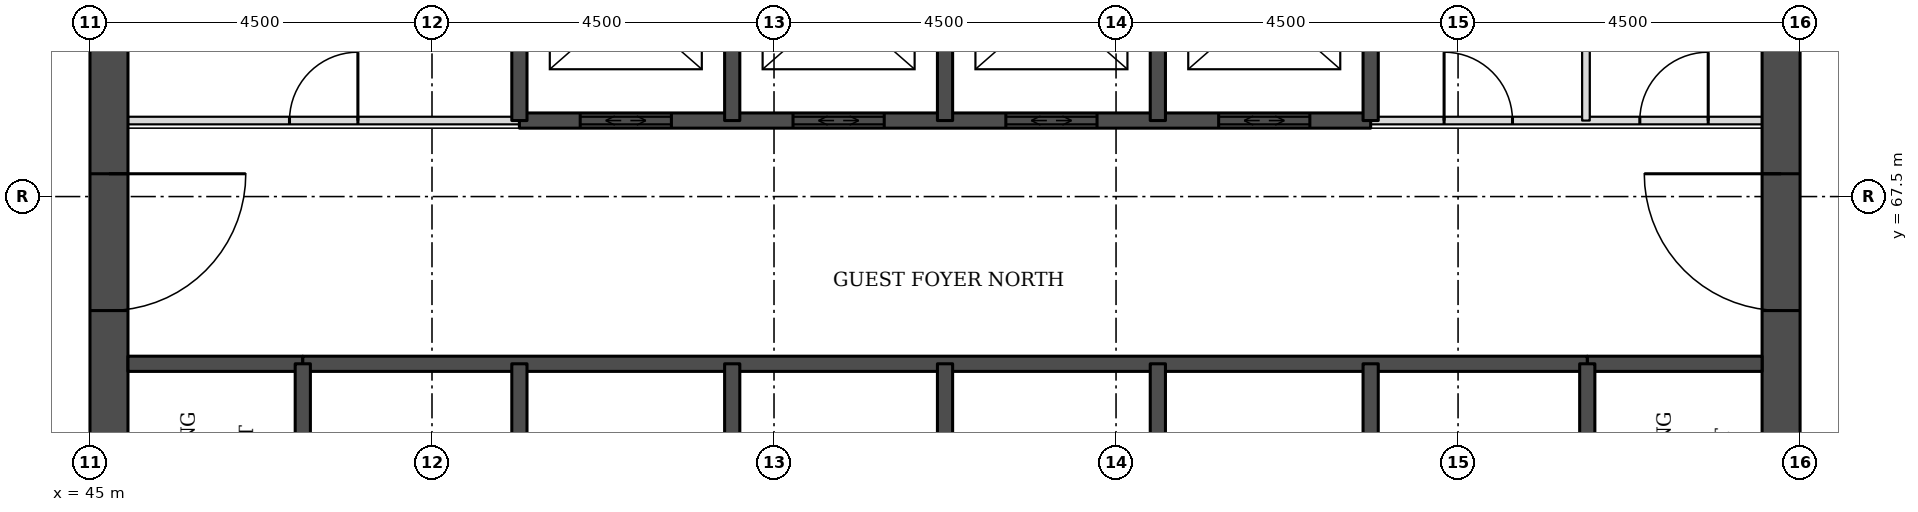
"""IFC4 building model, lengths in metres.
Left out: names, types, materials, properties, quantities, classifications, styles, units other than length and angle.
Written with IfcOpenShell. Run it as: python <this file> out.ifc"""

import sys

from ifc_helpers import new_model, si_unit, direction, frame, frame_2d, origin, place, context, subcontext, project, spatial, rectangle, extrude, element, fill, save


model = new_model("IFC4")
c1 = context("Model", 3, precision=1e-05, world=origin(), true_north=direction((0.0, 1.0)))
c2 = subcontext(c1, "Body", "Model", "MODEL_VIEW")
j1 = project(units=[si_unit("LENGTHUNIT", "METRE"), si_unit("PLANEANGLEUNIT", "RADIAN")], contexts=[c1])
p1 = place(None, origin())
s1 = spatial("IfcSite", under=j1, at=p1, CompositionType="ELEMENT")
p2 = place(p1, origin())
s2 = spatial("IfcBuilding", under=s1, at=p2, CompositionType="ELEMENT")
p3 = place(p2, frame((0.0, 0.0, 26.4)))
s3 = spatial("IfcBuildingStorey", under=s2, at=p3, CompositionType="ELEMENT", Elevation=26.4)
p4 = place(p3, frame((45.25, 49.5, 0.0), z_axis=(0.0, 0.0, 1.0), x_axis=(0.0, 1.0, 0.0)))
e1 = element("IfcWall", 1, at=p4, inside=s3, PredefinedType="SHEAR", context=c2, shape_type="SweptSolid", body=[
    extrude(rectangle(XDim=22.5, YDim=0.5, at=frame_2d((11.25, 0.0))), origin(), (0.0, 0.0, 1.0), 3.3),
])
p5 = place(p4, frame((4.2, 0.0, 0.0)))
e2 = element("IfcOpeningElement", 2, at=p5, cuts=e1, PredefinedType="OPENING", context=c2, shape_type="SweptSolid", body=[
    extrude(rectangle(XDim=1.8, YDim=2.1, at=frame_2d((0.9, 1.05))), frame((0.0, 0.26, 0.0), z_axis=(0.0, -1.0, 0.0), x_axis=(1.0, 0.0, 0.0)), (0.0, 0.0, 1.0), 0.52),
])
p6 = place(p4, frame((6.9, 0.0, 0.0)))
e3 = element("IfcOpeningElement", 3, at=p6, cuts=e1, PredefinedType="OPENING", context=c2, shape_type="SweptSolid", body=[
    extrude(rectangle(XDim=1.1, YDim=2.1, at=frame_2d((0.55, 1.05))), frame((0.0, 0.26, 0.0), z_axis=(0.0, -1.0, 0.0), x_axis=(1.0, 0.0, 0.0)), (0.0, 0.0, 1.0), 0.52),
])
p7 = place(p4, frame((13.6, 0.0, 0.0)))
e4 = element("IfcOpeningElement", 4, at=p7, cuts=e1, PredefinedType="OPENING", context=c2, shape_type="SweptSolid", body=[
    extrude(rectangle(XDim=1.1, YDim=2.1, at=frame_2d((0.55, 1.05))), frame((0.0, 0.26, 0.0), z_axis=(0.0, -1.0, 0.0), x_axis=(1.0, 0.0, 0.0)), (0.0, 0.0, 1.0), 0.52),
])
p8 = place(p4, frame((16.5, 0.0, 0.0)))
e5 = element("IfcOpeningElement", 5, at=p8, cuts=e1, PredefinedType="OPENING", context=c2, shape_type="SweptSolid", body=[
    extrude(rectangle(XDim=1.8, YDim=2.1, at=frame_2d((0.9, 1.05))), frame((0.0, 0.26, 0.0), z_axis=(0.0, -1.0, 0.0), x_axis=(1.0, 0.0, 0.0)), (0.0, 0.0, 1.0), 0.52),
])
p9 = place(p3, frame((67.25, 49.5, 0.0), z_axis=(0.0, 0.0, 1.0), x_axis=(0.0, 1.0, 0.0)))
e6 = element("IfcWall", 6, at=p9, inside=s3, PredefinedType="SHEAR", context=c2, shape_type="SweptSolid", body=[
    extrude(rectangle(XDim=22.5, YDim=0.5, at=frame_2d((11.25, 0.0))), origin(), (0.0, 0.0, 1.0), 3.3),
])
p10 = place(p9, frame((4.2, 0.0, 0.0)))
e7 = element("IfcOpeningElement", 7, at=p10, cuts=e6, PredefinedType="OPENING", context=c2, shape_type="SweptSolid", body=[
    extrude(rectangle(XDim=1.8, YDim=2.1, at=frame_2d((0.9, 1.05))), frame((0.0, 0.26, 0.0), z_axis=(0.0, -1.0, 0.0), x_axis=(1.0, 0.0, 0.0)), (0.0, 0.0, 1.0), 0.52),
])
p11 = place(p9, frame((6.9, 0.0, 0.0)))
e8 = element("IfcOpeningElement", 8, at=p11, cuts=e6, PredefinedType="OPENING", context=c2, shape_type="SweptSolid", body=[
    extrude(rectangle(XDim=1.1, YDim=2.1, at=frame_2d((0.55, 1.05))), frame((0.0, 0.26, 0.0), z_axis=(0.0, -1.0, 0.0), x_axis=(1.0, 0.0, 0.0)), (0.0, 0.0, 1.0), 0.52),
])
p12 = place(p9, frame((13.6, 0.0, 0.0)))
e9 = element("IfcOpeningElement", 9, at=p12, cuts=e6, PredefinedType="OPENING", context=c2, shape_type="SweptSolid", body=[
    extrude(rectangle(XDim=1.1, YDim=2.1, at=frame_2d((0.55, 1.05))), frame((0.0, 0.26, 0.0), z_axis=(0.0, -1.0, 0.0), x_axis=(1.0, 0.0, 0.0)), (0.0, 0.0, 1.0), 0.52),
])
p13 = place(p9, frame((16.5, 0.0, 0.0)))
e10 = element("IfcOpeningElement", 10, at=p13, cuts=e6, PredefinedType="OPENING", context=c2, shape_type="SweptSolid", body=[
    extrude(rectangle(XDim=1.8, YDim=2.1, at=frame_2d((0.9, 1.05))), frame((0.0, 0.26, 0.0), z_axis=(0.0, -1.0, 0.0), x_axis=(1.0, 0.0, 0.0)), (0.0, 0.0, 1.0), 0.52),
])
for number, where, z_axis, x_axis in (
    (11, (45.5, 65.3, 0.0), (0.0, 0.0, 1.0), (1.0, 0.0, 0.0)),
    (12, (64.7, 65.3, 0.0), (0.0, 0.0, 1.0), (1.0, 0.0, 0.0)),
):
    element("IfcWall", number, at=place(p3, frame(where, z_axis=z_axis, x_axis=x_axis)), inside=s3, PredefinedType="SOLIDWALL", context=c2, shape_type="SweptSolid", body=[
        extrude(rectangle(XDim=2.3, YDim=0.2, at=frame_2d((1.15, 0.0))), origin(), (0.0, 0.0, 1.0), 3.08),
    ])
p14 = place(p3, frame((47.8, 65.3, 0.0), z_axis=(0.0, 0.0, 1.0), x_axis=(1.0, 0.0, 0.0)))
e13 = element("IfcWall", 13, at=p14, inside=s3, PredefinedType="SOLIDWALL", context=c2, shape_type="SweptSolid", body=[
    extrude(rectangle(XDim=16.9, YDim=0.2, at=frame_2d((8.45, 0.0))), origin(), (0.0, 0.0, 1.0), 3.08),
])
p15 = place(p3, frame((45.5, 68.5, 0.0), z_axis=(0.0, 0.0, 1.0), x_axis=(1.0, 0.0, 0.0)))
e14 = element("IfcWall", 14, at=p15, inside=s3, PredefinedType="PARTITIONING", context=c2, shape_type="SweptSolid", body=[
    extrude(rectangle(XDim=5.15, YDim=0.1, at=frame_2d((2.575, 0.0))), origin(), (0.0, 0.0, 1.0), 3.08),
])
p16 = place(p15, frame((2.125, 0.0, 0.0)))
e15 = element("IfcOpeningElement", 15, at=p16, cuts=e14, PredefinedType="OPENING", context=c2, shape_type="SweptSolid", body=[
    extrude(rectangle(XDim=0.9, YDim=2.1, at=frame_2d((0.45, 1.05))), frame((0.0, 0.06, 0.0), z_axis=(0.0, -1.0, 0.0), x_axis=(1.0, 0.0, 0.0)), (0.0, 0.0, 1.0), 0.12),
])
p17 = place(p3, frame((61.85, 68.5, 0.0), z_axis=(0.0, 0.0, 1.0), x_axis=(1.0, 0.0, 0.0)))
e16 = element("IfcWall", 16, at=p17, inside=s3, PredefinedType="PARTITIONING", context=c2, shape_type="SweptSolid", body=[
    extrude(rectangle(XDim=5.15, YDim=0.1, at=frame_2d((2.575, 0.0))), origin(), (0.0, 0.0, 1.0), 3.08),
])
p18 = place(p17, frame((3.541, 0.0, 0.0)))
e17 = element("IfcOpeningElement", 17, at=p18, cuts=e16, PredefinedType="OPENING", context=c2, shape_type="SweptSolid", body=[
    extrude(rectangle(XDim=0.9, YDim=2.1, at=frame_2d((0.45, 1.05))), frame((0.0, 0.06, 0.0), z_axis=(0.0, -1.0, 0.0), x_axis=(1.0, 0.0, 0.0)), (0.0, 0.0, 1.0), 0.12),
])
p19 = place(p17, frame((0.966, 0.0, 0.0)))
e18 = element("IfcOpeningElement", 18, at=p19, cuts=e16, PredefinedType="OPENING", context=c2, shape_type="SweptSolid", body=[
    extrude(rectangle(XDim=0.9, YDim=2.1, at=frame_2d((0.45, 1.05))), frame((0.0, 0.06, 0.0), z_axis=(0.0, -1.0, 0.0), x_axis=(1.0, 0.0, 0.0)), (0.0, 0.0, 1.0), 0.12),
])
p20 = place(p3, frame((50.65, 68.5, 0.0), z_axis=(0.0, 0.0, 1.0), x_axis=(1.0, 0.0, 0.0)))
e19 = element("IfcWall", 19, at=p20, inside=s3, PredefinedType="SOLIDWALL", context=c2, shape_type="SweptSolid", body=[
    extrude(rectangle(XDim=11.2, YDim=0.2, at=frame_2d((5.6, 0.0))), origin(), (0.0, 0.0, 1.0), 3.08),
])
p21 = place(p20, frame((0.8, 0.0, 0.0)))
e20 = element("IfcOpeningElement", 20, at=p21, cuts=e19, PredefinedType="OPENING", context=c2, shape_type="SweptSolid", body=[
    extrude(rectangle(XDim=1.2, YDim=2.1, at=frame_2d((0.6, 1.05))), frame((0.0, 0.11, 0.0), z_axis=(0.0, -1.0, 0.0), x_axis=(1.0, 0.0, 0.0)), (0.0, 0.0, 1.0), 0.22),
])
p22 = place(p20, frame((3.6, 0.0, 0.0)))
e21 = element("IfcOpeningElement", 21, at=p22, cuts=e19, PredefinedType="OPENING", context=c2, shape_type="SweptSolid", body=[
    extrude(rectangle(XDim=1.2, YDim=2.1, at=frame_2d((0.6, 1.05))), frame((0.0, 0.11, 0.0), z_axis=(0.0, -1.0, 0.0), x_axis=(1.0, 0.0, 0.0)), (0.0, 0.0, 1.0), 0.22),
])
p23 = place(p20, frame((6.4, 0.0, 0.0)))
e22 = element("IfcOpeningElement", 22, at=p23, cuts=e19, PredefinedType="OPENING", context=c2, shape_type="SweptSolid", body=[
    extrude(rectangle(XDim=1.2, YDim=2.1, at=frame_2d((0.6, 1.05))), frame((0.0, 0.11, 0.0), z_axis=(0.0, -1.0, 0.0), x_axis=(1.0, 0.0, 0.0)), (0.0, 0.0, 1.0), 0.22),
])
p24 = place(p20, frame((9.2, 0.0, 0.0)))
e23 = element("IfcOpeningElement", 23, at=p24, cuts=e19, PredefinedType="OPENING", context=c2, shape_type="SweptSolid", body=[
    extrude(rectangle(XDim=1.2, YDim=2.1, at=frame_2d((0.6, 1.05))), frame((0.0, 0.11, 0.0), z_axis=(0.0, -1.0, 0.0), x_axis=(1.0, 0.0, 0.0)), (0.0, 0.0, 1.0), 0.22),
])
p25 = place(p3, frame((47.8, 62.0, 0.0), z_axis=(0.0, 0.0, 1.0), x_axis=(0.0, 1.0, 0.0)))
e24 = element("IfcWall", 24, at=p25, inside=s3, PredefinedType="SOLIDWALL", context=c2, shape_type="SweptSolid", body=[
    extrude(rectangle(XDim=3.3, YDim=0.2, at=frame_2d((1.65, 0.0))), origin(), (0.0, 0.0, 1.0), 3.08),
])
p26 = place(p25, frame((1.1, 0.0, 0.0)))
e25 = element("IfcOpeningElement", 25, at=p26, cuts=e24, PredefinedType="OPENING", context=c2, shape_type="SweptSolid", body=[
    extrude(rectangle(XDim=1.1, YDim=2.1, at=frame_2d((0.55, 1.05))), frame((0.0, 0.11, 0.0), z_axis=(0.0, -1.0, 0.0), x_axis=(1.0, 0.0, 0.0)), (0.0, 0.0, 1.0), 0.22),
])
p27 = place(p3, frame((50.65, 62.0, 0.0), z_axis=(0.0, 0.0, 1.0), x_axis=(0.0, 1.0, 0.0)))
e26 = element("IfcWall", 26, at=p27, inside=s3, PredefinedType="SOLIDWALL", context=c2, shape_type="SweptSolid", body=[
    extrude(rectangle(XDim=3.3, YDim=0.2, at=frame_2d((1.65, 0.0))), origin(), (0.0, 0.0, 1.0), 3.08),
])
p28 = place(p3, frame((50.65, 68.5, 0.0), z_axis=(0.0, 0.0, 1.0), x_axis=(0.0, 1.0, 0.0)))
e27 = element("IfcWall", 27, at=p28, inside=s3, PredefinedType="SOLIDWALL", context=c2, shape_type="SweptSolid", body=[
    extrude(rectangle(XDim=3.0, YDim=0.2, at=frame_2d((1.5, 0.0))), origin(), (0.0, 0.0, 1.0), 3.08),
])
p29 = place(p3, frame((53.45, 62.5, 0.0), z_axis=(0.0, 0.0, 1.0), x_axis=(0.0, 1.0, 0.0)))
e28 = element("IfcWall", 28, at=p29, inside=s3, PredefinedType="SOLIDWALL", context=c2, shape_type="SweptSolid", body=[
    extrude(rectangle(XDim=2.8, YDim=0.2, at=frame_2d((1.4, 0.0))), origin(), (0.0, 0.0, 1.0), 3.08),
])
p30 = place(p3, frame((53.45, 68.5, 0.0), z_axis=(0.0, 0.0, 1.0), x_axis=(0.0, 1.0, 0.0)))
e29 = element("IfcWall", 29, at=p30, inside=s3, PredefinedType="SOLIDWALL", context=c2, shape_type="SweptSolid", body=[
    extrude(rectangle(XDim=3.0, YDim=0.2, at=frame_2d((1.5, 0.0))), origin(), (0.0, 0.0, 1.0), 3.08),
])
p31 = place(p3, frame((56.25, 62.5, 0.0), z_axis=(0.0, 0.0, 1.0), x_axis=(0.0, 1.0, 0.0)))
e30 = element("IfcWall", 30, at=p31, inside=s3, PredefinedType="SOLIDWALL", context=c2, shape_type="SweptSolid", body=[
    extrude(rectangle(XDim=2.8, YDim=0.2, at=frame_2d((1.4, 0.0))), origin(), (0.0, 0.0, 1.0), 3.08),
])
p32 = place(p3, frame((56.25, 68.5, 0.0), z_axis=(0.0, 0.0, 1.0), x_axis=(0.0, 1.0, 0.0)))
e31 = element("IfcWall", 31, at=p32, inside=s3, PredefinedType="SOLIDWALL", context=c2, shape_type="SweptSolid", body=[
    extrude(rectangle(XDim=3.0, YDim=0.2, at=frame_2d((1.5, 0.0))), origin(), (0.0, 0.0, 1.0), 3.08),
])
p33 = place(p3, frame((59.05, 62.5, 0.0), z_axis=(0.0, 0.0, 1.0), x_axis=(0.0, 1.0, 0.0)))
e32 = element("IfcWall", 32, at=p33, inside=s3, PredefinedType="SOLIDWALL", context=c2, shape_type="SweptSolid", body=[
    extrude(rectangle(XDim=2.8, YDim=0.2, at=frame_2d((1.4, 0.0))), origin(), (0.0, 0.0, 1.0), 3.08),
])
p34 = place(p3, frame((59.05, 68.5, 0.0), z_axis=(0.0, 0.0, 1.0), x_axis=(0.0, 1.0, 0.0)))
e33 = element("IfcWall", 33, at=p34, inside=s3, PredefinedType="SOLIDWALL", context=c2, shape_type="SweptSolid", body=[
    extrude(rectangle(XDim=3.0, YDim=0.2, at=frame_2d((1.5, 0.0))), origin(), (0.0, 0.0, 1.0), 3.08),
])
p35 = place(p3, frame((61.85, 62.0, 0.0), z_axis=(0.0, 0.0, 1.0), x_axis=(0.0, 1.0, 0.0)))
e34 = element("IfcWall", 34, at=p35, inside=s3, PredefinedType="SOLIDWALL", context=c2, shape_type="SweptSolid", body=[
    extrude(rectangle(XDim=3.3, YDim=0.2, at=frame_2d((1.65, 0.0))), origin(), (0.0, 0.0, 1.0), 3.08),
])
p36 = place(p3, frame((61.85, 68.5, 0.0), z_axis=(0.0, 0.0, 1.0), x_axis=(0.0, 1.0, 0.0)))
e35 = element("IfcWall", 35, at=p36, inside=s3, PredefinedType="SOLIDWALL", context=c2, shape_type="SweptSolid", body=[
    extrude(rectangle(XDim=3.0, YDim=0.2, at=frame_2d((1.5, 0.0))), origin(), (0.0, 0.0, 1.0), 3.08),
])
p37 = place(p3, frame((64.683, 68.5, 0.0), z_axis=(0.0, 0.0, 1.0), x_axis=(0.0, 1.0, 0.0)))
e36 = element("IfcWall", 36, at=p37, inside=s3, PredefinedType="PARTITIONING", context=c2, shape_type="SweptSolid", body=[
    extrude(rectangle(XDim=3.0, YDim=0.1, at=frame_2d((1.5, 0.0))), origin(), (0.0, 0.0, 1.0), 3.08),
])
p38 = place(p3, frame((64.7, 62.0, 0.0), z_axis=(0.0, 0.0, 1.0), x_axis=(0.0, 1.0, 0.0)))
e37 = element("IfcWall", 37, at=p38, inside=s3, PredefinedType="SOLIDWALL", context=c2, shape_type="SweptSolid", body=[
    extrude(rectangle(XDim=3.3, YDim=0.2, at=frame_2d((1.65, 0.0))), origin(), (0.0, 0.0, 1.0), 3.08),
])
p39 = place(p38, frame((1.1, 0.0, 0.0)))
e38 = element("IfcOpeningElement", 38, at=p39, cuts=e37, PredefinedType="OPENING", context=c2, shape_type="SweptSolid", body=[
    extrude(rectangle(XDim=1.1, YDim=2.1, at=frame_2d((0.55, 1.05))), frame((0.0, 0.11, 0.0), z_axis=(0.0, -1.0, 0.0), x_axis=(1.0, 0.0, 0.0)), (0.0, 0.0, 1.0), 0.22),
])
p40 = place(p21, origin())
e39 = element("IfcDoor", 39, at=p40, inside=s3, OperationType="DOUBLE_DOOR_SLIDING", PredefinedType="DOOR", context=c2, shape_type="SweptSolid", body=[
    extrude(rectangle(XDim=1.2, YDim=2.1, at=frame_2d((0.6, 1.05))), frame((0.0, 0.025, 0.0), z_axis=(0.0, -1.0, 0.0), x_axis=(1.0, 0.0, 0.0)), (0.0, 0.0, 1.0), 0.05),
])
fill(e20, e39)
p41 = place(p22, origin())
e40 = element("IfcDoor", 40, at=p41, inside=s3, OperationType="DOUBLE_DOOR_SLIDING", PredefinedType="DOOR", context=c2, shape_type="SweptSolid", body=[
    extrude(rectangle(XDim=1.2, YDim=2.1, at=frame_2d((0.6, 1.05))), frame((0.0, 0.025, 0.0), z_axis=(0.0, -1.0, 0.0), x_axis=(1.0, 0.0, 0.0)), (0.0, 0.0, 1.0), 0.05),
])
fill(e21, e40)
p42 = place(p23, origin())
e41 = element("IfcDoor", 41, at=p42, inside=s3, OperationType="DOUBLE_DOOR_SLIDING", PredefinedType="DOOR", context=c2, shape_type="SweptSolid", body=[
    extrude(rectangle(XDim=1.2, YDim=2.1, at=frame_2d((0.6, 1.05))), frame((0.0, 0.025, 0.0), z_axis=(0.0, -1.0, 0.0), x_axis=(1.0, 0.0, 0.0)), (0.0, 0.0, 1.0), 0.05),
])
fill(e22, e41)
p43 = place(p24, origin())
e42 = element("IfcDoor", 42, at=p43, inside=s3, OperationType="DOUBLE_DOOR_SLIDING", PredefinedType="DOOR", context=c2, shape_type="SweptSolid", body=[
    extrude(rectangle(XDim=1.2, YDim=2.1, at=frame_2d((0.6, 1.05))), frame((0.0, 0.025, 0.0), z_axis=(0.0, -1.0, 0.0), x_axis=(1.0, 0.0, 0.0)), (0.0, 0.0, 1.0), 0.05),
])
fill(e23, e42)
p44 = place(p8, frame((1.8, 0.0, 0.0), z_axis=(0.0, 0.0, 1.0), x_axis=(-1.0, 0.0, 0.0)))
e43 = element("IfcDoor", 43, at=p44, inside=s3, OperationType="SINGLE_SWING_LEFT", PredefinedType="DOOR", context=c2, shape_type="SweptSolid", body=[
    extrude(rectangle(XDim=1.8, YDim=2.1, at=frame_2d((0.9, 1.05))), frame((0.0, 0.025, 0.0), z_axis=(0.0, -1.0, 0.0), x_axis=(1.0, 0.0, 0.0)), (0.0, 0.0, 1.0), 0.05),
])
fill(e5, e43)
p45 = place(p13, origin())
e44 = element("IfcDoor", 44, at=p45, inside=s3, OperationType="SINGLE_SWING_RIGHT", PredefinedType="DOOR", context=c2, shape_type="SweptSolid", body=[
    extrude(rectangle(XDim=1.8, YDim=2.1, at=frame_2d((0.9, 1.05))), frame((0.0, 0.025, 0.0), z_axis=(0.0, -1.0, 0.0), x_axis=(1.0, 0.0, 0.0)), (0.0, 0.0, 1.0), 0.05),
])
fill(e10, e44)
p46 = place(p18, origin())
e45 = element("IfcDoor", 45, at=p46, inside=s3, OperationType="SINGLE_SWING_RIGHT", PredefinedType="DOOR", context=c2, shape_type="SweptSolid", body=[
    extrude(rectangle(XDim=0.9, YDim=2.1, at=frame_2d((0.45, 1.05))), frame((0.0, 0.025, 0.0), z_axis=(0.0, -1.0, 0.0), x_axis=(1.0, 0.0, 0.0)), (0.0, 0.0, 1.0), 0.05),
])
fill(e17, e45)
p47 = place(p19, origin())
e46 = element("IfcDoor", 46, at=p47, inside=s3, OperationType="SINGLE_SWING_LEFT", PredefinedType="DOOR", context=c2, shape_type="SweptSolid", body=[
    extrude(rectangle(XDim=0.9, YDim=2.1, at=frame_2d((0.45, 1.05))), frame((0.0, 0.025, 0.0), z_axis=(0.0, -1.0, 0.0), x_axis=(1.0, 0.0, 0.0)), (0.0, 0.0, 1.0), 0.05),
])
fill(e18, e46)
p48 = place(p16, origin())
e47 = element("IfcDoor", 47, at=p48, inside=s3, OperationType="SINGLE_SWING_RIGHT", PredefinedType="DOOR", context=c2, shape_type="SweptSolid", body=[
    extrude(rectangle(XDim=0.9, YDim=2.1, at=frame_2d((0.45, 1.05))), frame((0.0, 0.025, 0.0), z_axis=(0.0, -1.0, 0.0), x_axis=(1.0, 0.0, 0.0)), (0.0, 0.0, 1.0), 0.05),
])
fill(e15, e47)
save(model, sys.argv[1])
